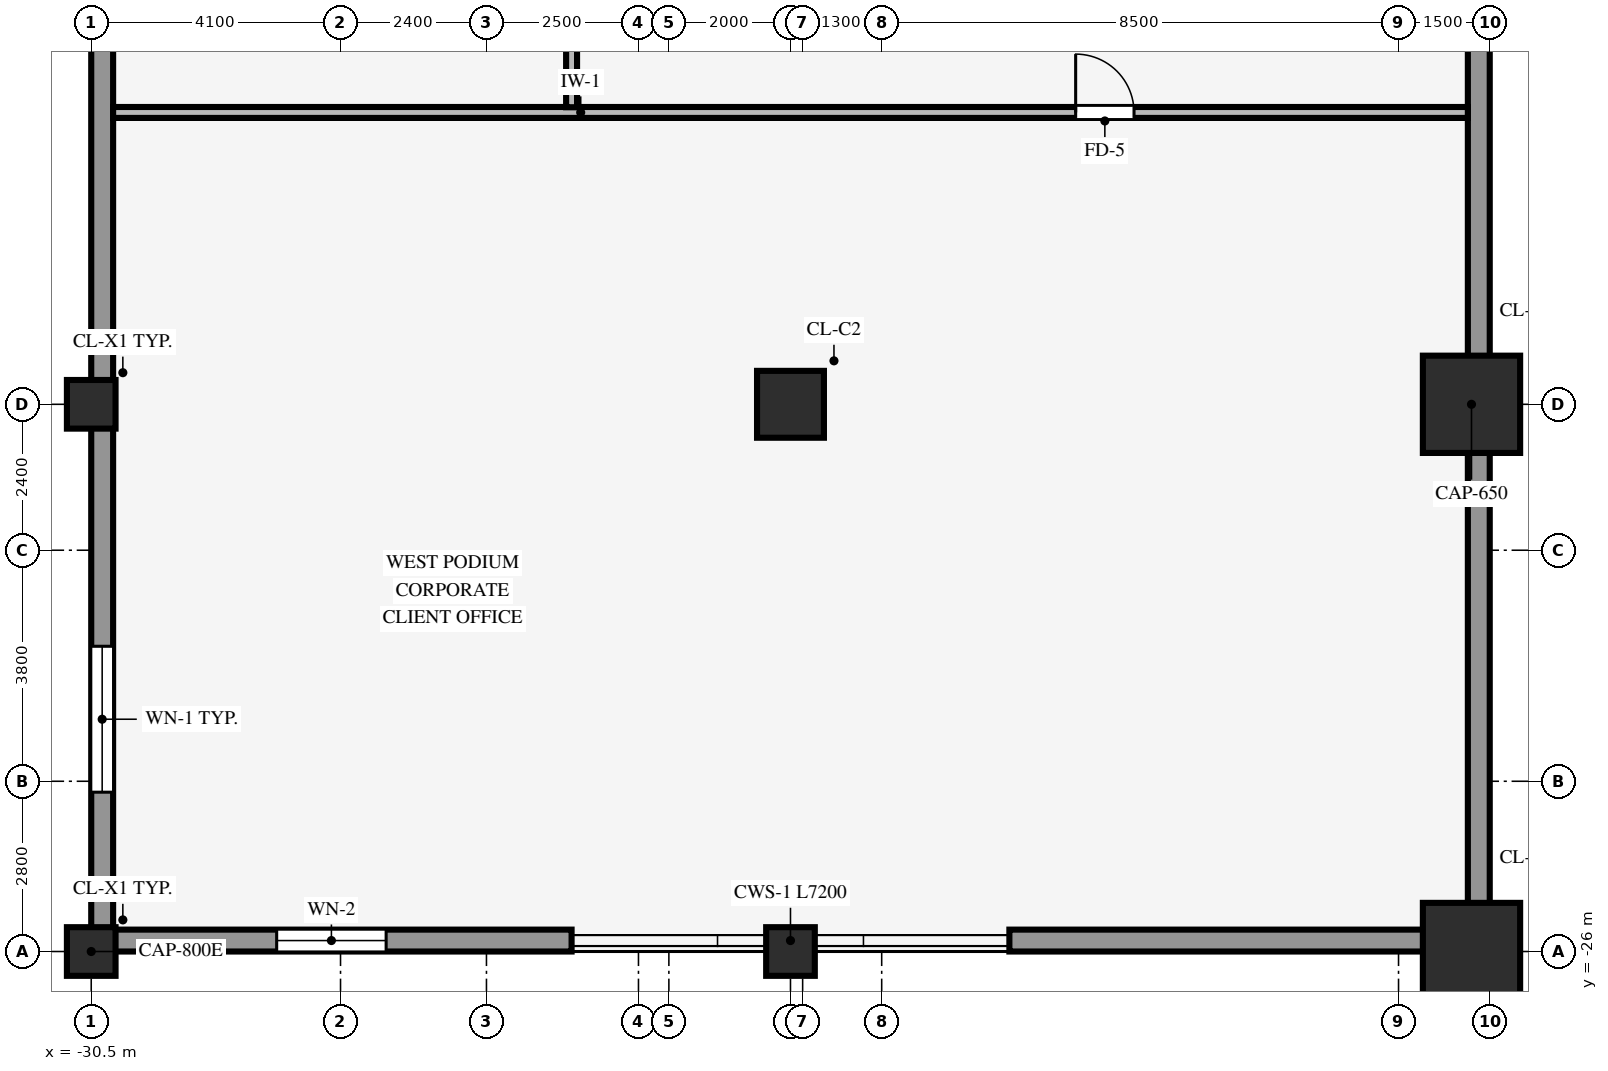
"""IFC4 building model, lengths in metres.
Left out: names, types, materials, properties, quantities, classifications, styles, units other than length and angle.
Written with IfcOpenShell. Run it as: python <this file> out.ifc"""

import sys

from ifc_helpers import new_model, si_unit, direction, frame, frame_2d, origin, origin_2d, place, context, subcontext, project, spatial, rectangle, hollow_rectangle, extrude, source, transform, mapped, element, fill, save


model = new_model("IFC4")
c1 = context("Model", 3, precision=1e-05, world=origin(), true_north=direction((0.0, 1.0)))
c2 = subcontext(c1, "Body", "Model", "MODEL_VIEW")
j1 = project(units=[si_unit("LENGTHUNIT", "METRE"), si_unit("PLANEANGLEUNIT", "RADIAN")], contexts=[c1])
p1 = place(None, origin())
s1 = spatial("IfcSite", under=j1, at=p1, CompositionType="ELEMENT")
p2 = place(p1, origin())
s2 = spatial("IfcBuilding", under=s1, at=p2, CompositionType="ELEMENT")
p3 = place(p2, frame((0.0, 0.0, 13.8)))
s3 = spatial("IfcBuildingStorey", under=s2, at=p3, CompositionType="ELEMENT", Elevation=13.8)
for number, where, z_axis, x_axis in (
    (1, (-7.8, -26.0, 0.0), (0.0, 0.0, 1.0), (1.0, 0.0, 0.0)),
    (2, (-7.8, -17.0, 0.0), (0.0, 0.0, 1.0), (1.0, 0.0, 0.0)),
):
    element("IfcColumn", number, at=place(p3, frame(where, z_axis=z_axis, x_axis=x_axis)), inside=s3, PredefinedType="COLUMN", context=c2, shape_type="SweptSolid", body=[
        extrude(rectangle(XDim=1.6, YDim=1.6, at=origin_2d()), origin(), (0.0, 0.0, 1.0), 4.2),
    ])
for number, where, z_axis, x_axis in (
    (3, (-30.5, -26.0, 0.0), (0.0, 0.0, 1.0), (1.0, 0.0, 0.0)),
    (4, (-30.5, -17.0, 0.0), (0.0, 0.0, 1.0), (1.0, 0.0, 0.0)),
    (5, (-19.0, -26.0, 0.0), (0.0, 0.0, 1.0), (1.0, 0.0, 0.0)),
):
    element("IfcColumn", number, at=place(p3, frame(where, z_axis=z_axis, x_axis=x_axis)), inside=s3, PredefinedType="COLUMN", context=c2, shape_type="SweptSolid", body=[
        extrude(hollow_rectangle(XDim=0.8, YDim=0.8, WallThickness=0.055, InnerFilletRadius=0.055, OuterFilletRadius=0.11, at=origin_2d()), origin(), (0.0, 0.0, 1.0), 4.2),
    ])
p4 = place(p3, frame((-19.0, -17.0, 0.0), z_axis=(0.0, 0.0, 1.0), x_axis=(1.0, 0.0, 0.0)))
e6 = element("IfcColumn", 6, at=p4, inside=s3, PredefinedType="COLUMN", context=c2, shape_type="SweptSolid", body=[
    extrude(rectangle(XDim=1.1, YDim=1.1, at=origin_2d()), origin(), (0.0, 0.0, 1.0), 4.2),
])
p5 = place(p3, frame((-30.5, -25.82, 0.0), z_axis=(0.0, 0.0, 1.0), x_axis=(1.0, 0.0, 0.0)))
e7 = element("IfcWall", 7, at=p5, inside=s3, PredefinedType="STANDARD", context=c2, shape_type="SweptSolid", body=[
    extrude(rectangle(XDim=7.9, YDim=0.36, at=frame_2d((3.95, 0.0))), origin(), (0.0, 0.0, 1.0), 3.535),
])
p6 = place(p5, frame((3.05, 0.0, 0.85)))
e8 = element("IfcOpeningElement", 8, at=p6, cuts=e7, PredefinedType="OPENING", context=c2, shape_type="SweptSolid", body=[
    extrude(rectangle(XDim=1.8, YDim=2.35, at=frame_2d((0.9, 1.175))), frame((0.0, 0.19, 0.0), z_axis=(0.0, -1.0, 0.0), x_axis=(1.0, 0.0, 0.0)), (0.0, 0.0, 1.0), 0.38),
])
p7 = place(p3, frame((-15.4, -25.82, 0.0), z_axis=(0.0, 0.0, 1.0), x_axis=(1.0, 0.0, 0.0)))
e9 = element("IfcWall", 9, at=p7, inside=s3, PredefinedType="STANDARD", context=c2, shape_type="SweptSolid", body=[
    extrude(rectangle(XDim=7.9, YDim=0.36, at=frame_2d((3.95, 0.0))), origin(), (0.0, 0.0, 1.0), 2.585),
])
p8 = place(p3, frame((-7.68, -25.644, 0.0), z_axis=(0.0, 0.0, 1.0), x_axis=(0.0, 1.0, 0.0)))
e10 = element("IfcWall", 10, at=p8, inside=s3, PredefinedType="STANDARD", context=c2, shape_type="SweptSolid", body=[
    extrude(rectangle(XDim=51.288, YDim=0.36, at=frame_2d((25.644, 0.0))), origin(), (0.0, 0.0, 1.0), 2.985),
])
p9 = place(p3, frame((-30.32, -25.644, 0.0), z_axis=(0.0, 0.0, 1.0), x_axis=(0.0, 1.0, 0.0)))
e11 = element("IfcWall", 11, at=p9, inside=s3, PredefinedType="STANDARD", context=c2, shape_type="SweptSolid", body=[
    extrude(rectangle(XDim=51.288, YDim=0.36, at=frame_2d((25.644, 0.0))), origin(), (0.0, 0.0, 1.0), 3.535),
])
p10 = place(p9, frame((2.264, 0.0, 0.85)))
e12 = element("IfcOpeningElement", 12, at=p10, cuts=e11, PredefinedType="OPENING", context=c2, shape_type="SweptSolid", body=[
    extrude(rectangle(XDim=2.4, YDim=2.45, at=frame_2d((1.2, 1.225))), frame((0.0, 0.19, 0.0), z_axis=(0.0, -1.0, 0.0), x_axis=(1.0, 0.0, 0.0)), (0.0, 0.0, 1.0), 0.38),
])
p11 = place(p9, frame((17.051, 0.0, 0.85)))
e13 = element("IfcOpeningElement", 13, at=p11, cuts=e11, PredefinedType="OPENING", context=c2, shape_type="SweptSolid", body=[
    extrude(rectangle(XDim=2.4, YDim=2.45, at=frame_2d((1.2, 1.225))), frame((0.0, 0.19, 0.0), z_axis=(0.0, -1.0, 0.0), x_axis=(1.0, 0.0, 0.0)), (0.0, 0.0, 1.0), 0.38),
])
p12 = place(p9, frame((21.979, 0.0, 0.85)))
e14 = element("IfcOpeningElement", 14, at=p12, cuts=e11, PredefinedType="OPENING", context=c2, shape_type="SweptSolid", body=[
    extrude(rectangle(XDim=2.4, YDim=2.45, at=frame_2d((1.2, 1.225))), frame((0.0, 0.19, 0.0), z_axis=(0.0, -1.0, 0.0), x_axis=(1.0, 0.0, 0.0)), (0.0, 0.0, 1.0), 0.38),
])
p13 = place(p9, frame((26.908, 0.0, 0.85)))
e15 = element("IfcOpeningElement", 15, at=p13, cuts=e11, PredefinedType="OPENING", context=c2, shape_type="SweptSolid", body=[
    extrude(rectangle(XDim=2.4, YDim=2.45, at=frame_2d((1.2, 1.225))), frame((0.0, 0.19, 0.0), z_axis=(0.0, -1.0, 0.0), x_axis=(1.0, 0.0, 0.0)), (0.0, 0.0, 1.0), 0.38),
])
p14 = place(p9, frame((31.837, 0.0, 0.85)))
e16 = element("IfcOpeningElement", 16, at=p14, cuts=e11, PredefinedType="OPENING", context=c2, shape_type="SweptSolid", body=[
    extrude(rectangle(XDim=2.4, YDim=2.45, at=frame_2d((1.2, 1.225))), frame((0.0, 0.19, 0.0), z_axis=(0.0, -1.0, 0.0), x_axis=(1.0, 0.0, 0.0)), (0.0, 0.0, 1.0), 0.38),
])
p15 = place(p9, frame((46.624, 0.0, 0.85)))
e17 = element("IfcOpeningElement", 17, at=p15, cuts=e11, PredefinedType="OPENING", context=c2, shape_type="SweptSolid", body=[
    extrude(rectangle(XDim=2.4, YDim=2.45, at=frame_2d((1.2, 1.225))), frame((0.0, 0.19, 0.0), z_axis=(0.0, -1.0, 0.0), x_axis=(1.0, 0.0, 0.0)), (0.0, 0.0, 1.0), 0.38),
])
p16 = place(p3, frame((-30.14, -12.2, 0.0), z_axis=(0.0, 0.0, 1.0), x_axis=(1.0, 0.0, 0.0)))
e18 = element("IfcWall", 18, at=p16, inside=s3, PredefinedType="PARTITIONING", context=c2, shape_type="SweptSolid", body=[
    extrude(rectangle(XDim=22.28, YDim=0.18, at=frame_2d((11.14, 0.0))), origin(), (0.0, 0.0, 1.0), 4.19),
])
p17 = place(p16, frame((15.83, 0.0, 0.0)))
e19 = element("IfcOpeningElement", 19, at=p17, cuts=e18, PredefinedType="OPENING", context=c2, shape_type="SweptSolid", body=[
    extrude(rectangle(XDim=0.96, YDim=2.1, at=frame_2d((0.48, 1.05))), frame((0.0, 0.1, 0.0), z_axis=(0.0, -1.0, 0.0), x_axis=(1.0, 0.0, 0.0)), (0.0, 0.0, 1.0), 0.2),
])
p18 = place(p3, frame((-22.6, -12.114, 0.0), z_axis=(0.0, 0.0, 1.0), x_axis=(0.0, 1.0, 0.0)))
e20 = element("IfcWall", 20, at=p18, inside=s3, PredefinedType="PARTITIONING", context=c2, shape_type="SweptSolid", body=[
    extrude(rectangle(XDim=37.919, YDim=0.18, at=frame_2d((18.959, 0.0))), origin(), (0.0, 0.0, 1.0), 4.19),
])
p19 = place(p18, frame((11.634, 0.0, 0.0)))
e21 = element("IfcOpeningElement", 21, at=p19, cuts=e20, PredefinedType="OPENING", context=c2, shape_type="SweptSolid", body=[
    extrude(rectangle(XDim=0.96, YDim=2.1, at=frame_2d((0.48, 1.05))), frame((0.0, 0.1, 0.0), z_axis=(0.0, -1.0, 0.0), x_axis=(1.0, 0.0, 0.0)), (0.0, 0.0, 1.0), 0.2),
])
p20 = place(p18, frame((29.534, 0.0, 0.0)))
e22 = element("IfcOpeningElement", 22, at=p20, cuts=e20, PredefinedType="OPENING", context=c2, shape_type="SweptSolid", body=[
    extrude(rectangle(XDim=0.96, YDim=2.1, at=frame_2d((0.48, 1.05))), frame((0.0, 0.1, 0.0), z_axis=(0.0, -1.0, 0.0), x_axis=(1.0, 0.0, 0.0)), (0.0, 0.0, 1.0), 0.2),
])
m1 = source(origin(), c2, "Body", "SweptSolid", [
    extrude(rectangle(XDim=1.8, YDim=2.35, at=frame_2d((0.9, 1.175))), frame((0.0, 0.03, 0.0), z_axis=(0.0, -1.0, 0.0), x_axis=(1.0, 0.0, 0.0)), (0.0, 0.0, 1.0), 0.06),
])
p21 = place(p6, origin())
e23 = element("IfcWindow", 23, at=p21, inside=s3, PartitioningType="SINGLE_PANEL", PredefinedType="WINDOW", context=c2, shape_type="MappedRepresentation", body=[
    mapped(m1, transform((0.0, 0.0, 0.0), scale=1.0)),
])
fill(e8, e23)
m2 = source(origin(), c2, "Body", "SweptSolid", [
    extrude(rectangle(XDim=2.4, YDim=2.45, at=frame_2d((1.2, 1.225))), frame((0.0, 0.03, 0.0), z_axis=(0.0, -1.0, 0.0), x_axis=(1.0, 0.0, 0.0)), (0.0, 0.0, 1.0), 0.06),
])
p22 = place(p10, origin())
e24 = element("IfcWindow", 24, at=p22, inside=s3, PartitioningType="SINGLE_PANEL", PredefinedType="WINDOW", context=c2, shape_type="MappedRepresentation", body=[
    mapped(m2, transform((0.0, 0.0, 0.0), scale=1.0)),
])
fill(e12, e24)
m3 = source(origin(), c2, "Body", "SweptSolid", [
    extrude(rectangle(XDim=0.96, YDim=2.1, at=frame_2d((0.48, 1.05))), frame((0.0, 0.025, 0.0), z_axis=(0.0, -1.0, 0.0), x_axis=(1.0, 0.0, 0.0)), (0.0, 0.0, 1.0), 0.05),
])
p23 = place(p17, origin())
e25 = element("IfcDoor", 25, at=p23, inside=s3, OperationType="SINGLE_SWING_LEFT", PredefinedType="DOOR", context=c2, shape_type="MappedRepresentation", body=[
    mapped(m3, transform((0.0, 0.0, 0.0), scale=1.0)),
])
fill(e19, e25)
save(model, sys.argv[1])
